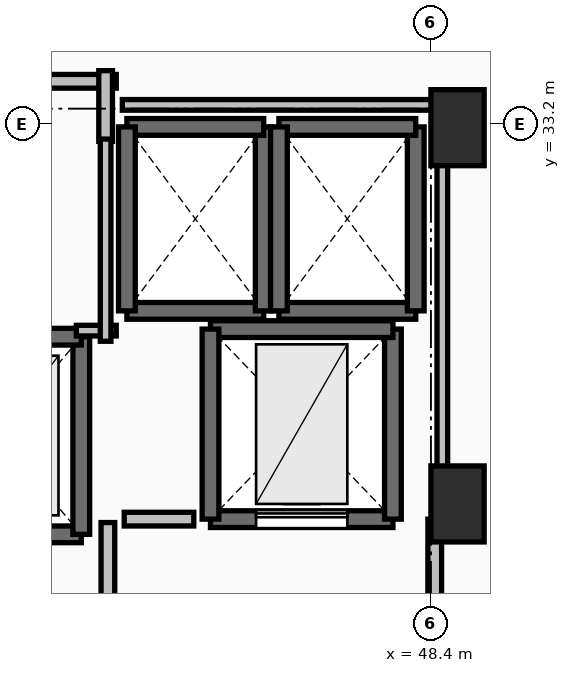
"""IFC4 building model, lengths in metres.
Left out: names, types, materials, properties, quantities, classifications, styles, units other than length and angle.
Written with IfcOpenShell. Run it as: python <this file> out.ifc"""

import sys

from ifc_helpers import new_model, si_unit, direction, frame, frame_2d, origin, origin_2d, place, context, subcontext, project, spatial, rectangle, extrude, element, fill, save


model = new_model("IFC4")
c1 = context("Model", 3, precision=1e-05, world=origin(), true_north=direction((0.0, 1.0)))
c2 = subcontext(c1, "Body", "Model", "MODEL_VIEW")
j1 = project(units=[si_unit("LENGTHUNIT", "METRE"), si_unit("PLANEANGLEUNIT", "RADIAN")], contexts=[c1])
p1 = place(None, origin())
s1 = spatial("IfcSite", under=j1, at=p1, CompositionType="ELEMENT")
p2 = place(p1, origin())
s2 = spatial("IfcBuilding", under=s1, at=p2, CompositionType="ELEMENT")
p3 = place(p2, frame((0.0, 0.0, 241.35)))
s3 = spatial("IfcBuildingStorey", under=s2, at=p3, CompositionType="ELEMENT", Elevation=241.35)
for number, where, z_axis, x_axis in (
    (1, (48.75, 33.15, 0.0), (0.0, 0.0, 1.0), (1.0, 0.0, 0.0)),
    (2, (48.75, 28.2, 0.0), (0.0, 0.0, 1.0), (1.0, 0.0, 0.0)),
):
    element("IfcColumn", number, at=place(p3, frame(where, z_axis=z_axis, x_axis=x_axis)), inside=s3, PredefinedType="PILASTER", context=c2, shape_type="SweptSolid", body=[
        extrude(rectangle(XDim=0.7, YDim=1.0, at=origin_2d()), origin(), (0.0, 0.0, 1.0), 3.55),
    ])
p4 = place(p3, frame((41.6, 27.8, 0.0), z_axis=(0.0, 0.0, 1.0), x_axis=(1.0, 0.0, 0.0)))
e3 = element("IfcWall", 3, at=p4, inside=s3, PredefinedType="SOLIDWALL", context=c2, shape_type="SweptSolid", body=[
    extrude(rectangle(XDim=2.2, YDim=0.22, at=frame_2d((1.1, 0.0))), origin(), (0.0, 0.0, 1.0), 3.29),
])
p5 = place(p4, frame((0.55, 0.0, 0.0)))
e4 = element("IfcOpeningElement", 4, at=p5, cuts=e3, PredefinedType="OPENING", context=c2, shape_type="SweptSolid", body=[
    extrude(rectangle(XDim=1.1, YDim=2.2, at=frame_2d((0.55, 1.1))), frame((0.0, 0.125, 0.0), z_axis=(0.0, -1.0, 0.0), x_axis=(1.0, 0.0, 0.0)), (0.0, 0.0, 1.0), 0.25),
])
p6 = place(p3, frame((43.8, 27.8, 0.0), z_axis=(0.0, 0.0, 1.0), x_axis=(0.0, 1.0, 0.0)))
e5 = element("IfcWall", 5, at=p6, inside=s3, PredefinedType="SOLIDWALL", context=c2, shape_type="SweptSolid", body=[
    extrude(rectangle(XDim=2.6, YDim=0.22, at=frame_2d((1.3, 0.0))), origin(), (0.0, 0.0, 1.0), 3.29),
])
p7 = place(p3, frame((43.8, 30.4, 0.0), z_axis=(0.0, 0.0, 1.0), x_axis=(-1.0, 0.0, 0.0)))
e6 = element("IfcWall", 6, at=p7, inside=s3, PredefinedType="SOLIDWALL", context=c2, shape_type="SweptSolid", body=[
    extrude(rectangle(XDim=2.2, YDim=0.22, at=frame_2d((1.1, 0.0))), origin(), (0.0, 0.0, 1.0), 3.29),
])
p8 = place(p3, frame((44.4, 30.74, 0.0), z_axis=(0.0, 0.0, 1.0), x_axis=(1.0, 0.0, 0.0)))
e7 = element("IfcWall", 7, at=p8, inside=s3, PredefinedType="SOLIDWALL", context=c2, shape_type="SweptSolid", body=[
    extrude(rectangle(XDim=1.8, YDim=0.22, at=frame_2d((0.9, 0.0))), origin(), (0.0, 0.0, 1.0), 3.29),
])
p9 = place(p3, frame((46.2, 30.74, 0.0), z_axis=(0.0, 0.0, 1.0), x_axis=(0.0, 1.0, 0.0)))
e8 = element("IfcWall", 8, at=p9, inside=s3, PredefinedType="SOLIDWALL", context=c2, shape_type="SweptSolid", body=[
    extrude(rectangle(XDim=2.42, YDim=0.22, at=frame_2d((1.21, 0.0))), origin(), (0.0, 0.0, 1.0), 3.29),
])
p10 = place(p3, frame((46.2, 33.16, 0.0), z_axis=(0.0, 0.0, 1.0), x_axis=(-1.0, 0.0, 0.0)))
e9 = element("IfcWall", 9, at=p10, inside=s3, PredefinedType="SOLIDWALL", context=c2, shape_type="SweptSolid", body=[
    extrude(rectangle(XDim=1.8, YDim=0.22, at=frame_2d((0.9, 0.0))), origin(), (0.0, 0.0, 1.0), 3.29),
])
p11 = place(p3, frame((44.4, 33.16, 0.0), z_axis=(0.0, 0.0, 1.0), x_axis=(0.0, -1.0, 0.0)))
e10 = element("IfcWall", 10, at=p11, inside=s3, PredefinedType="SOLIDWALL", context=c2, shape_type="SweptSolid", body=[
    extrude(rectangle(XDim=2.42, YDim=0.22, at=frame_2d((1.21, 0.0))), origin(), (0.0, 0.0, 1.0), 3.29),
])
p12 = place(p3, frame((46.4, 30.74, 0.0), z_axis=(0.0, 0.0, 1.0), x_axis=(1.0, 0.0, 0.0)))
e11 = element("IfcWall", 11, at=p12, inside=s3, PredefinedType="SOLIDWALL", context=c2, shape_type="SweptSolid", body=[
    extrude(rectangle(XDim=1.8, YDim=0.22, at=frame_2d((0.9, 0.0))), origin(), (0.0, 0.0, 1.0), 3.29),
])
p13 = place(p3, frame((48.2, 30.74, 0.0), z_axis=(0.0, 0.0, 1.0), x_axis=(0.0, 1.0, 0.0)))
e12 = element("IfcWall", 12, at=p13, inside=s3, PredefinedType="SOLIDWALL", context=c2, shape_type="SweptSolid", body=[
    extrude(rectangle(XDim=2.42, YDim=0.22, at=frame_2d((1.21, 0.0))), origin(), (0.0, 0.0, 1.0), 3.29),
])
p14 = place(p3, frame((48.2, 33.16, 0.0), z_axis=(0.0, 0.0, 1.0), x_axis=(-1.0, 0.0, 0.0)))
e13 = element("IfcWall", 13, at=p14, inside=s3, PredefinedType="SOLIDWALL", context=c2, shape_type="SweptSolid", body=[
    extrude(rectangle(XDim=1.8, YDim=0.22, at=frame_2d((0.9, 0.0))), origin(), (0.0, 0.0, 1.0), 3.29),
])
p15 = place(p3, frame((46.4, 33.16, 0.0), z_axis=(0.0, 0.0, 1.0), x_axis=(0.0, -1.0, 0.0)))
e14 = element("IfcWall", 14, at=p15, inside=s3, PredefinedType="SOLIDWALL", context=c2, shape_type="SweptSolid", body=[
    extrude(rectangle(XDim=2.42, YDim=0.22, at=frame_2d((1.21, 0.0))), origin(), (0.0, 0.0, 1.0), 3.29),
])
p16 = place(p3, frame((45.5, 28.0, 0.0), z_axis=(0.0, 0.0, 1.0), x_axis=(1.0, 0.0, 0.0)))
e15 = element("IfcWall", 15, at=p16, inside=s3, PredefinedType="SHEAR", context=c2, shape_type="SweptSolid", body=[
    extrude(rectangle(XDim=2.4, YDim=0.22, at=frame_2d((1.2, 0.0))), origin(), (0.0, 0.0, 1.0), 3.29),
])
p17 = place(p16, frame((0.6, 0.0, 0.0)))
e16 = element("IfcOpeningElement", 16, at=p17, cuts=e15, PredefinedType="OPENING", context=c2, shape_type="SweptSolid", body=[
    extrude(rectangle(XDim=1.2, YDim=2.2, at=frame_2d((0.6, 1.1))), frame((0.0, 0.125, 0.0), z_axis=(0.0, -1.0, 0.0), x_axis=(1.0, 0.0, 0.0)), (0.0, 0.0, 1.0), 0.25),
])
p18 = place(p3, frame((47.9, 28.0, 0.0), z_axis=(0.0, 0.0, 1.0), x_axis=(0.0, 1.0, 0.0)))
e17 = element("IfcWall", 17, at=p18, inside=s3, PredefinedType="SHEAR", context=c2, shape_type="SweptSolid", body=[
    extrude(rectangle(XDim=2.5, YDim=0.22, at=frame_2d((1.25, 0.0))), origin(), (0.0, 0.0, 1.0), 3.29),
])
p19 = place(p3, frame((47.9, 30.5, 0.0), z_axis=(0.0, 0.0, 1.0), x_axis=(-1.0, 0.0, 0.0)))
e18 = element("IfcWall", 18, at=p19, inside=s3, PredefinedType="SHEAR", context=c2, shape_type="SweptSolid", body=[
    extrude(rectangle(XDim=2.4, YDim=0.22, at=frame_2d((1.2, 0.0))), origin(), (0.0, 0.0, 1.0), 3.29),
])
p20 = place(p3, frame((45.5, 30.5, 0.0), z_axis=(0.0, 0.0, 1.0), x_axis=(0.0, -1.0, 0.0)))
e19 = element("IfcWall", 19, at=p20, inside=s3, PredefinedType="SHEAR", context=c2, shape_type="SweptSolid", body=[
    extrude(rectangle(XDim=2.5, YDim=0.22, at=frame_2d((1.25, 0.0))), origin(), (0.0, 0.0, 1.0), 3.29),
])
p21 = place(p3, frame((44.15, 27.955, 0.0), z_axis=(0.0, 0.0, 1.0), x_axis=(0.0, -1.0, 0.0)))
e20 = element("IfcWall", 20, at=p21, inside=s3, PredefinedType="PARTITIONING", context=c2, shape_type="SweptSolid", body=[
    extrude(rectangle(XDim=3.91, YDim=0.18, at=frame_2d((1.955, 0.0))), origin(), (0.0, 0.0, 1.0), 3.29),
])
p22 = place(p21, frame((1.355, 0.0, 0.0)))
e21 = element("IfcOpeningElement", 21, at=p22, cuts=e20, PredefinedType="OPENING", context=c2, shape_type="SweptSolid", body=[
    extrude(rectangle(XDim=1.2, YDim=2.15, at=frame_2d((0.6, 1.075))), frame((0.0, 0.105, 0.0), z_axis=(0.0, -1.0, 0.0), x_axis=(1.0, 0.0, 0.0)), (0.0, 0.0, 1.0), 0.21),
])
p23 = place(p3, frame((48.45, 23.95, 0.0), z_axis=(0.0, 0.0, 1.0), x_axis=(0.0, 1.0, 0.0)))
e22 = element("IfcWall", 22, at=p23, inside=s3, PredefinedType="PARTITIONING", context=c2, shape_type="SweptSolid", body=[
    extrude(rectangle(XDim=4.05, YDim=0.18, at=frame_2d((2.025, 0.0))), origin(), (0.0, 0.0, 1.0), 3.29),
])
p24 = place(p23, frame((1.425, 0.0, 0.0)))
e23 = element("IfcOpeningElement", 23, at=p24, cuts=e22, PredefinedType="OPENING", context=c2, shape_type="SweptSolid", body=[
    extrude(rectangle(XDim=1.2, YDim=2.15, at=frame_2d((0.6, 1.075))), frame((0.0, 0.105, 0.0), z_axis=(0.0, -1.0, 0.0), x_axis=(1.0, 0.0, 0.0)), (0.0, 0.0, 1.0), 0.21),
])
p25 = place(p3, frame((44.26, 33.76, 0.0), z_axis=(0.0, 0.0, 1.0), x_axis=(-1.0, 0.0, 0.0)))
e24 = element("IfcWall", 24, at=p25, inside=s3, PredefinedType="PARTITIONING", context=c2, shape_type="SweptSolid", body=[
    extrude(rectangle(XDim=6.91, YDim=0.18, at=frame_2d((3.455, 0.0))), origin(), (0.0, 0.0, 1.0), 3.29),
])
p26 = place(p25, frame((3.03, 0.0, 0.0)))
e25 = element("IfcOpeningElement", 25, at=p26, cuts=e24, PredefinedType="OPENING", context=c2, shape_type="SweptSolid", body=[
    extrude(rectangle(XDim=0.85, YDim=2.1, at=frame_2d((0.425, 1.05))), frame((0.0, 0.105, 0.0), z_axis=(0.0, -1.0, 0.0), x_axis=(1.0, 0.0, 0.0)), (0.0, 0.0, 1.0), 0.21),
])
p27 = place(p3, frame((44.12, 32.97, 0.0), z_axis=(0.0, 0.0, 1.0), x_axis=(0.0, 1.0, 0.0)))
e26 = element("IfcWall", 26, at=p27, inside=s3, PredefinedType="PARTITIONING", context=c2, shape_type="SweptSolid", body=[
    extrude(rectangle(XDim=0.93, YDim=0.18, at=frame_2d((0.465, 0.0))), origin(), (0.0, 0.0, 1.0), 3.29),
])
p28 = place(p3, frame((45.28, 28.0, 0.0), z_axis=(0.0, 0.0, 1.0), x_axis=(-1.0, 0.0, 0.0)))
e27 = element("IfcWall", 27, at=p28, inside=s3, PredefinedType="PARTITIONING", context=c2, shape_type="SweptSolid", body=[
    extrude(rectangle(XDim=0.915, YDim=0.18, at=frame_2d((0.458, 0.0))), origin(), (0.0, 0.0, 1.0), 3.29),
])
p29 = place(p3, frame((43.735, 30.48, 0.0), z_axis=(0.0, 0.0, 1.0), x_axis=(1.0, 0.0, 0.0)))
e28 = element("IfcWall", 28, at=p29, inside=s3, PredefinedType="PARTITIONING", context=c2, shape_type="SweptSolid", body=[
    extrude(rectangle(XDim=0.525, YDim=0.14, at=frame_2d((0.262, 0.0))), origin(), (0.0, 0.0, 1.0), 3.29),
])
p30 = place(p3, frame((44.12, 30.34, 0.0), z_axis=(0.0, 0.0, 1.0), x_axis=(0.0, 1.0, 0.0)))
e29 = element("IfcWall", 29, at=p30, inside=s3, PredefinedType="PARTITIONING", context=c2, shape_type="SweptSolid", body=[
    extrude(rectangle(XDim=2.66, YDim=0.14, at=frame_2d((1.33, 0.0))), origin(), (0.0, 0.0, 1.0), 3.29),
])
p31 = place(p3, frame((48.55, 28.196, 0.0), z_axis=(0.0, 0.0, 1.0), x_axis=(0.0, 1.0, 0.0)))
e30 = element("IfcWall", 30, at=p31, inside=s3, PredefinedType="PARTITIONING", context=c2, shape_type="SweptSolid", body=[
    extrude(rectangle(XDim=5.254, YDim=0.14, at=frame_2d((2.627, 0.0))), origin(), (0.0, 0.0, 1.0), 2.482),
])
p32 = place(p3, frame((48.55, 33.45, 0.0), z_axis=(0.0, 0.0, 1.0), x_axis=(-1.0, 0.0, 0.0)))
e31 = element("IfcWall", 31, at=p32, inside=s3, PredefinedType="PARTITIONING", context=c2, shape_type="SweptSolid", body=[
    extrude(rectangle(XDim=4.21, YDim=0.14, at=frame_2d((2.105, 0.0))), origin(), (0.0, 0.0, 1.0), 2.482),
])
p33 = place(p17, origin())
e32 = element("IfcDoor", 32, at=p33, inside=s3, OperationType="SLIDING_TO_LEFT", PredefinedType="DOOR", context=c2, shape_type="SweptSolid", body=[
    extrude(rectangle(XDim=1.2, YDim=2.2, at=frame_2d((0.6, 1.1))), frame((0.0, 0.025, 0.0), z_axis=(0.0, -1.0, 0.0), x_axis=(1.0, 0.0, 0.0)), (0.0, 0.0, 1.0), 0.05),
])
fill(e16, e32)
save(model, sys.argv[1])
